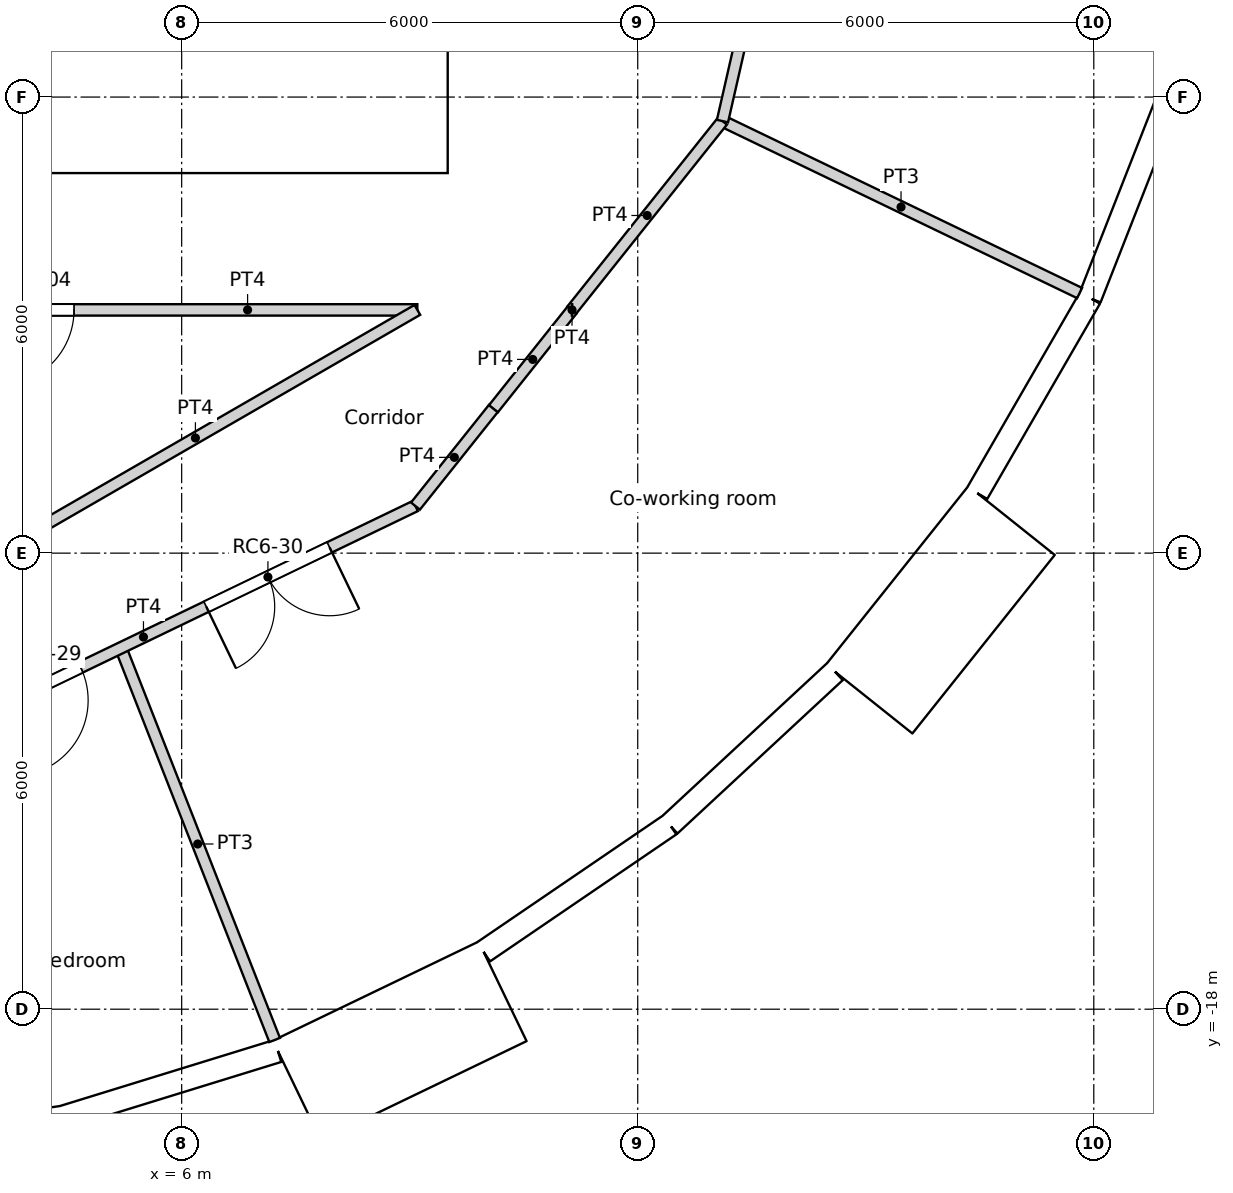
"""IFC4 building model, lengths in metres.
Left out: names, types, materials, properties, quantities, classifications, styles, units other than length and angle.
Written with IfcOpenShell. Run it as: python <this file> out.ifc"""

import sys

from ifc_helpers import new_model, si_unit, direction, frame, frame_2d, origin, origin_2d, place, context, subcontext, project, spatial, rectangle, circle, extrude, element, fill, save


model = new_model("IFC4")
c1 = context("Model", 3, precision=1e-05, world=origin(), true_north=direction((0.0, 1.0)))
c2 = subcontext(c1, "Body", "Model", "MODEL_VIEW")
j1 = project(units=[si_unit("LENGTHUNIT", "METRE"), si_unit("PLANEANGLEUNIT", "RADIAN")], contexts=[c1])
p1 = place(None, origin())
s1 = spatial("IfcSite", under=j1, at=p1, CompositionType="ELEMENT")
p2 = place(p1, origin())
s2 = spatial("IfcBuilding", under=s1, at=p2, CompositionType="ELEMENT")
p3 = place(p2, frame((0.0, 0.0, 283.8)))
s3 = spatial("IfcBuildingStorey", under=s2, at=p3, CompositionType="ELEMENT", Elevation=283.8)
for number, where, z_axis, x_axis in (
    (1, (6.876, -17.521, 0.0), (0.0, 0.0, 1.0), (1.0, 0.0, 0.0)),
    (2, (11.735, -14.716, 0.0), (0.0, 0.0, 1.0), (1.0, 0.0, 0.0)),
    (3, (15.552, -10.603, 0.0), (0.0, 0.0, 1.0), (1.0, 0.0, 0.0)),
    (4, (17.986, -5.548, 0.0), (0.0, 0.0, 1.0), (1.0, 0.0, 0.0)),
):
    element("IfcColumn", number, at=place(p3, frame(where, z_axis=z_axis, x_axis=x_axis)), inside=s3, PredefinedType="COLUMN", context=c2, shape_type="SweptSolid", body=[
        extrude(circle(Radius=0.45, at=origin_2d()), origin(), (0.0, 0.0, 1.0), 3.6),
    ])
p4 = place(p3, frame((1.504, -19.864, 0.0), z_axis=(0.0, 0.0, 1.0), x_axis=(0.988835775663, 0.149009425104, 0.0)))
e5 = element("IfcWall", 5, at=p4, inside=s3, PredefinedType="SOLIDWALL", context=c2, shape_type="SweptSolid", body=[
    extrude(rectangle(XDim=2.962, YDim=0.3, at=frame_2d((1.481, 0.0))), origin(), (0.0, 0.0, 1.0), 3.25),
])
p5 = place(p4, frame((1.481, 0.0, 1.55)))
e6 = element("IfcOpeningElement", 6, at=p5, cuts=e5, PredefinedType="OPENING", context=c2, shape_type="SweptSolid", body=[
    extrude(circle(Radius=0.9, at=origin_2d()), frame((0.0, 0.16, 0.0), z_axis=(0.0, -1.0, 0.0), x_axis=(1.0, 0.0, 0.0)), (0.0, 0.0, 1.0), 0.32),
])
p6 = place(p3, frame((4.433, -19.422, 0.0), z_axis=(0.0, 0.0, 1.0), x_axis=(0.955555982805, 0.29480970765, 0.0)))
e7 = element("IfcWall", 7, at=p6, inside=s3, PredefinedType="SOLIDWALL", context=c2, shape_type="SweptSolid", body=[
    extrude(rectangle(XDim=2.962, YDim=0.3, at=frame_2d((1.481, 0.0))), origin(), (0.0, 0.0, 1.0), 3.25),
])
p7 = place(p6, frame((1.481, 0.0, 1.55)))
e8 = element("IfcOpeningElement", 8, at=p7, cuts=e7, PredefinedType="OPENING", context=c2, shape_type="SweptSolid", body=[
    extrude(circle(Radius=0.9, at=origin_2d()), frame((0.0, 0.16, 0.0), z_axis=(0.0, -1.0, 0.0), x_axis=(1.0, 0.0, 0.0)), (0.0, 0.0, 1.0), 0.32),
])
p8 = place(p3, frame((7.518, -19.068, -0.35), z_axis=(0.0, 0.0, 1.0), x_axis=(0.900953362039, 0.433915935904, 0.0)))
e9 = element("IfcWall", 9, at=p8, inside=s3, PredefinedType="ELEMENTEDWALL", context=c2, shape_type="SweptSolid", body=[
    extrude(rectangle(XDim=3.0, YDim=1.45, at=frame_2d((1.5, 0.0))), origin(), (0.0, 0.0, 1.0), 3.6),
])
p9 = place(p8, frame((1.5, 0.0, 1.9)))
e10 = element("IfcOpeningElement", 10, at=p9, cuts=e9, PredefinedType="OPENING", context=c2, shape_type="SweptSolid", body=[
    extrude(circle(Radius=0.9, at=origin_2d()), frame((0.0, 0.735, 0.0), z_axis=(0.0, -1.0, 0.0), x_axis=(1.0, 0.0, 0.0)), (0.0, 0.0, 1.0), 1.47),
])
p10 = place(p3, frame((9.974, -17.244, 0.0), z_axis=(0.0, 0.0, 1.0), x_axis=(0.826236061068, 0.563324037646, 0.0)))
e11 = element("IfcWall", 11, at=p10, inside=s3, PredefinedType="SOLIDWALL", context=c2, shape_type="SweptSolid", body=[
    extrude(rectangle(XDim=2.962, YDim=0.3, at=frame_2d((1.481, 0.0))), origin(), (0.0, 0.0, 1.0), 3.25),
])
p11 = place(p10, frame((1.481, 0.0, 1.55)))
e12 = element("IfcOpeningElement", 12, at=p11, cuts=e11, PredefinedType="OPENING", context=c2, shape_type="SweptSolid", body=[
    extrude(circle(Radius=0.9, at=origin_2d()), frame((0.0, 0.16, 0.0), z_axis=(0.0, -1.0, 0.0), x_axis=(1.0, 0.0, 0.0)), (0.0, 0.0, 1.0), 0.32),
])
p12 = place(p3, frame((12.421, -15.575, 0.0), z_axis=(0.0, 0.0, 1.0), x_axis=(0.733028283666, 0.680198158882, 0.0)))
e13 = element("IfcWall", 13, at=p12, inside=s3, PredefinedType="SOLIDWALL", context=c2, shape_type="SweptSolid", body=[
    extrude(rectangle(XDim=2.962, YDim=0.3, at=frame_2d((1.481, 0.0))), origin(), (0.0, 0.0, 1.0), 3.25),
])
p13 = place(p12, frame((1.481, 0.0, 1.55)))
e14 = element("IfcOpeningElement", 14, at=p13, cuts=e13, PredefinedType="OPENING", context=c2, shape_type="SweptSolid", body=[
    extrude(circle(Radius=0.9, at=origin_2d()), frame((0.0, 0.16, 0.0), z_axis=(0.0, -1.0, 0.0), x_axis=(1.0, 0.0, 0.0)), (0.0, 0.0, 1.0), 0.32),
])
p14 = place(p3, frame((15.046, -13.917, -0.35), z_axis=(0.0, 0.0, 1.0), x_axis=(0.623523286312, 0.781804778335, 0.0)))
e15 = element("IfcWall", 15, at=p14, inside=s3, PredefinedType="ELEMENTEDWALL", context=c2, shape_type="SweptSolid", body=[
    extrude(rectangle(XDim=3.0, YDim=1.45, at=frame_2d((1.5, 0.0))), origin(), (0.0, 0.0, 1.0), 3.6),
])
p15 = place(p14, frame((1.5, 0.0, 1.9)))
e16 = element("IfcOpeningElement", 16, at=p15, cuts=e15, PredefinedType="OPENING", context=c2, shape_type="SweptSolid", body=[
    extrude(circle(Radius=0.9, at=origin_2d()), frame((0.0, 0.735, 0.0), z_axis=(0.0, -1.0, 0.0), x_axis=(1.0, 0.0, 0.0)), (0.0, 0.0, 1.0), 1.47),
])
p16 = place(p3, frame((16.468, -11.209, 0.0), z_axis=(0.0, 0.0, 1.0), x_axis=(0.500012570604, 0.866018146021, 0.0)))
e17 = element("IfcWall", 17, at=p16, inside=s3, PredefinedType="SOLIDWALL", context=c2, shape_type="SweptSolid", body=[
    extrude(rectangle(XDim=2.962, YDim=0.3, at=frame_2d((1.481, 0.0))), origin(), (0.0, 0.0, 1.0), 3.25),
])
p17 = place(p16, frame((1.481, 0.0, 1.55)))
e18 = element("IfcOpeningElement", 18, at=p17, cuts=e17, PredefinedType="OPENING", context=c2, shape_type="SweptSolid", body=[
    extrude(circle(Radius=0.9, at=origin_2d()), frame((0.0, 0.16, 0.0), z_axis=(0.0, -1.0, 0.0), x_axis=(1.0, 0.0, 0.0)), (0.0, 0.0, 1.0), 0.32),
])
p18 = place(p3, frame((17.949, -8.644, 0.0), z_axis=(0.0, 0.0, 1.0), x_axis=(0.365343821297, 0.930872650925, 0.0)))
e19 = element("IfcWall", 19, at=p18, inside=s3, PredefinedType="SOLIDWALL", context=c2, shape_type="SweptSolid", body=[
    extrude(rectangle(XDim=2.962, YDim=0.3, at=frame_2d((1.481, 0.0))), origin(), (0.0, 0.0, 1.0), 3.25),
])
p19 = place(p18, frame((1.481, 0.0, 1.55)))
e20 = element("IfcOpeningElement", 20, at=p19, cuts=e19, PredefinedType="OPENING", context=c2, shape_type="SweptSolid", body=[
    extrude(circle(Radius=0.9, at=origin_2d()), frame((0.0, 0.16, 0.0), z_axis=(0.0, -1.0, 0.0), x_axis=(1.0, 0.0, 0.0)), (0.0, 0.0, 1.0), 0.32),
])
p20 = place(p3, frame((-9.5, -6.7, 0.0), z_axis=(0.0, 0.0, 1.0), x_axis=(1.0, 0.0, 0.0)))
e21 = element("IfcWall", 21, at=p20, inside=s3, PredefinedType="SOLIDWALL", context=c2, shape_type="SweptSolid", body=[
    extrude(rectangle(XDim=19.0, YDim=0.6, at=frame_2d((9.5, 0.0))), origin(), (0.0, 0.0, 1.0), 3.6),
])
p21 = place(p20, frame((10.4, 0.0, 0.0)))
e22 = element("IfcOpeningElement", 22, at=p21, cuts=e21, PredefinedType="OPENING", context=c2, shape_type="SweptSolid", body=[
    extrude(rectangle(XDim=1.0, YDim=2.1, at=frame_2d((0.5, 1.05))), frame((0.0, 0.3, 0.0), z_axis=(0.0, -1.0, 0.0), x_axis=(1.0, 0.0, 0.0)), (0.0, 0.0, 1.0), 0.6),
])
p22 = place(p20, frame((5.35, 0.0, 0.0)))
e23 = element("IfcOpeningElement", 23, at=p22, cuts=e21, PredefinedType="OPENING", context=c2, shape_type="SweptSolid", body=[
    extrude(rectangle(XDim=1.7, YDim=2.1, at=frame_2d((0.85, 1.05))), frame((0.0, 0.3, 0.0), z_axis=(0.0, -1.0, 0.0), x_axis=(1.0, 0.0, 0.0)), (0.0, 0.0, 1.0), 0.6),
])
p23 = place(p20, frame((11.95, 0.0, 0.0)))
e24 = element("IfcOpeningElement", 24, at=p23, cuts=e21, PredefinedType="OPENING", context=c2, shape_type="SweptSolid", body=[
    extrude(rectangle(XDim=1.7, YDim=2.1, at=frame_2d((0.85, 1.05))), frame((0.0, 0.3, 0.0), z_axis=(0.0, -1.0, 0.0), x_axis=(1.0, 0.0, 0.0)), (0.0, 0.0, 1.0), 0.6),
])
p24 = place(p3, frame((9.2, -6.4, 0.0), z_axis=(0.0, 0.0, 1.0), x_axis=(0.0, 1.0, 0.0)))
e25 = element("IfcWall", 25, at=p24, inside=s3, PredefinedType="SOLIDWALL", context=c2, shape_type="SweptSolid", body=[
    extrude(rectangle(XDim=12.8, YDim=0.6, at=frame_2d((6.4, 0.0))), origin(), (0.0, 0.0, 1.0), 3.6),
])
p25 = place(p24, frame((6.4, 0.0, 0.0)))
e26 = element("IfcOpeningElement", 26, at=p25, cuts=e25, PredefinedType="OPENING", context=c2, shape_type="SweptSolid", body=[
    extrude(rectangle(XDim=1.8, YDim=2.1, at=frame_2d((0.9, 1.05))), frame((0.0, 0.3, 0.0), z_axis=(0.0, -1.0, 0.0), x_axis=(1.0, 0.0, 0.0)), (0.0, 0.0, 1.0), 0.6),
])
p26 = place(p3, frame((-0.924, -8.8, 0.0), z_axis=(0.0, 0.0, 1.0), x_axis=(1.0, 0.0, 0.0)))
e27 = element("IfcWall", 27, at=p26, inside=s3, PredefinedType="PARTITIONING", context=c2, shape_type="SweptSolid", body=[
    extrude(rectangle(XDim=10.025, YDim=0.15, at=frame_2d((5.012, 0.0))), origin(), (0.0, 0.0, 1.0), 3.25),
])
p27 = place(p26, frame((4.508, 0.0, 0.0)))
e28 = element("IfcOpeningElement", 28, at=p27, cuts=e27, PredefinedType="OPENING", context=c2, shape_type="SweptSolid", body=[
    extrude(rectangle(XDim=1.0, YDim=2.04, at=frame_2d((0.5, 1.02))), frame((0.0, 0.075, 0.0), z_axis=(0.0, -1.0, 0.0), x_axis=(1.0, 0.0, 0.0)), (0.0, 0.0, 1.0), 0.15),
])
p28 = place(p3, frame((11.137, -8.8, 0.0), z_axis=(0.0, 0.0, 1.0), x_axis=(-1.0, 0.0, 0.0)))
e29 = element("IfcWall", 29, at=p28, inside=s3, PredefinedType="PARTITIONING", context=c2, shape_type="SweptSolid", body=[
    extrude(rectangle(XDim=0.003, YDim=0.15, at=frame_2d((0.001, 0.0))), origin(), (0.0, 0.0, 1.0), 3.25),
])
p29 = place(p3, frame((10.101, -10.101, 0.0), z_axis=(0.0, 0.0, 1.0), x_axis=(0.623098344652, 0.782143498913, 0.0)))
e30 = element("IfcWall", 30, at=p29, inside=s3, PredefinedType="PARTITIONING", context=c2, shape_type="SweptSolid", body=[
    extrude(rectangle(XDim=1.661, YDim=0.15, at=frame_2d((0.831, 0.0))), origin(), (0.0, 0.0, 1.0), 3.25),
])
p30 = place(p3, frame((11.134, -8.8, 0.0), z_axis=(0.0, 0.0, 1.0), x_axis=(0.623476099415, 0.781842409606, 0.0)))
e31 = element("IfcWall", 31, at=p30, inside=s3, PredefinedType="PARTITIONING", context=c2, shape_type="SweptSolid", body=[
    extrude(rectangle(XDim=3.177, YDim=0.15, at=frame_2d((1.589, 0.0))), origin(), (0.0, 0.0, 1.0), 3.25),
])
p31 = place(p3, frame((13.115, -6.316, 0.0), z_axis=(0.0, 0.0, 1.0), x_axis=(0.222568978642, 0.97491694505, 0.0)))
e32 = element("IfcWall", 32, at=p31, inside=s3, PredefinedType="PARTITIONING", context=c2, shape_type="SweptSolid", body=[
    extrude(rectangle(XDim=6.479, YDim=0.15, at=frame_2d((3.239, 0.0))), origin(), (0.0, 0.0, 1.0), 3.25),
])
p32 = place(p31, frame((2.74, 0.0, 0.0)))
e33 = element("IfcOpeningElement", 33, at=p32, cuts=e32, PredefinedType="OPENING", context=c2, shape_type="SweptSolid", body=[
    extrude(rectangle(XDim=1.0, YDim=2.04, at=frame_2d((0.5, 1.02))), frame((0.0, 0.075, 0.0), z_axis=(0.0, -1.0, 0.0), x_axis=(1.0, 0.0, 0.0)), (0.0, 0.0, 1.0), 0.15),
])
p33 = place(p3, frame((3.261, -12.171, 0.0), z_axis=(0.0, 0.0, 1.0), x_axis=(0.866066809554, 0.499928276245, 0.0)))
e34 = element("IfcWall", 34, at=p33, inside=s3, PredefinedType="PARTITIONING", context=c2, shape_type="SweptSolid", body=[
    extrude(rectangle(XDim=6.743, YDim=0.15, at=frame_2d((3.371, 0.0))), origin(), (0.0, 0.0, 1.0), 3.25),
])
p34 = place(p3, frame((3.239, -14.192, 0.0), z_axis=(0.0, 0.0, 1.0), x_axis=(0.900851590682, 0.434127183629, 0.0)))
e35 = element("IfcWall", 35, at=p34, inside=s3, PredefinedType="PARTITIONING", context=c2, shape_type="SweptSolid", body=[
    extrude(rectangle(XDim=6.479, YDim=0.15, at=frame_2d((3.239, 0.0))), origin(), (0.0, 0.0, 1.0), 3.25),
])
p35 = place(p34, frame((0.589, 0.0, 0.0)))
e36 = element("IfcOpeningElement", 36, at=p35, cuts=e35, PredefinedType="OPENING", context=c2, shape_type="SweptSolid", body=[
    extrude(rectangle(XDim=1.0, YDim=2.1, at=frame_2d((0.5, 1.05))), frame((0.0, 0.075, 0.0), z_axis=(0.0, -1.0, 0.0), x_axis=(1.0, 0.0, 0.0)), (0.0, 0.0, 1.0), 0.15),
])
p36 = place(p34, frame((3.425, 0.0, 0.0)))
e37 = element("IfcOpeningElement", 37, at=p36, cuts=e35, PredefinedType="OPENING", context=c2, shape_type="SweptSolid", body=[
    extrude(rectangle(XDim=1.8, YDim=2.1, at=frame_2d((0.9, 1.05))), frame((0.0, 0.075, 0.0), z_axis=(0.0, -1.0, 0.0), x_axis=(1.0, 0.0, 0.0)), (0.0, 0.0, 1.0), 0.15),
])
p37 = place(p3, frame((9.076, -11.381, 0.0), z_axis=(0.0, 0.0, 1.0), x_axis=(0.623805208652, 0.781579849829, 0.0)))
e38 = element("IfcWall", 38, at=p37, inside=s3, PredefinedType="PARTITIONING", context=c2, shape_type="SweptSolid", body=[
    extrude(rectangle(XDim=1.64, YDim=0.15, at=frame_2d((0.82, 0.0))), origin(), (0.0, 0.0, 1.0), 3.25),
])
p38 = place(p3, frame((5.199, -13.248, 0.0), z_axis=(0.0, 0.0, 1.0), x_axis=(0.365334662456, -0.930876245485, 0.0)))
e39 = element("IfcWall", 39, at=p38, inside=s3, PredefinedType="PARTITIONING", context=c2, shape_type="SweptSolid", body=[
    extrude(rectangle(XDim=5.54, YDim=0.15, at=frame_2d((2.77, 0.0))), origin(), (0.0, 0.0, 1.0), 3.25),
])
p39 = place(p3, frame((13.115, -6.316, 0.0), z_axis=(0.0, 0.0, 1.0), x_axis=(0.901004381064, -0.433809987557, 0.0)))
e40 = element("IfcWall", 40, at=p39, inside=s3, PredefinedType="PARTITIONING", context=c2, shape_type="SweptSolid", body=[
    extrude(rectangle(XDim=5.214, YDim=0.15, at=frame_2d((2.607, 0.0))), origin(), (0.0, 0.0, 1.0), 3.25),
])
p40 = place(p7, origin())
e41 = element("IfcWindow", 41, at=p40, inside=s3, PartitioningType="SINGLE_PANEL", PredefinedType="WINDOW", context=c2, shape_type="SweptSolid", body=[
    extrude(circle(Radius=0.9, at=origin_2d()), frame((0.0, 0.12, 0.0), z_axis=(0.0, -1.0, 0.0), x_axis=(1.0, 0.0, 0.0)), (0.0, 0.0, 1.0), 0.1),
])
fill(e8, e41)
p41 = place(p9, origin())
e42 = element("IfcWindow", 42, at=p41, inside=s3, PartitioningType="SINGLE_PANEL", PredefinedType="WINDOW", context=c2, shape_type="SweptSolid", body=[
    extrude(circle(Radius=0.9, at=origin_2d()), frame((0.0, 0.695, 0.0), z_axis=(0.0, -1.0, 0.0), x_axis=(1.0, 0.0, 0.0)), (0.0, 0.0, 1.0), 0.1),
])
fill(e10, e42)
p42 = place(p11, origin())
e43 = element("IfcWindow", 43, at=p42, inside=s3, PartitioningType="SINGLE_PANEL", PredefinedType="WINDOW", context=c2, shape_type="SweptSolid", body=[
    extrude(circle(Radius=0.9, at=origin_2d()), frame((0.0, 0.12, 0.0), z_axis=(0.0, -1.0, 0.0), x_axis=(1.0, 0.0, 0.0)), (0.0, 0.0, 1.0), 0.1),
])
fill(e12, e43)
p43 = place(p13, origin())
e44 = element("IfcWindow", 44, at=p43, inside=s3, PartitioningType="SINGLE_PANEL", PredefinedType="WINDOW", context=c2, shape_type="SweptSolid", body=[
    extrude(circle(Radius=0.9, at=origin_2d()), frame((0.0, 0.12, 0.0), z_axis=(0.0, -1.0, 0.0), x_axis=(1.0, 0.0, 0.0)), (0.0, 0.0, 1.0), 0.1),
])
fill(e14, e44)
p44 = place(p15, origin())
e45 = element("IfcWindow", 45, at=p44, inside=s3, PartitioningType="SINGLE_PANEL", PredefinedType="WINDOW", context=c2, shape_type="SweptSolid", body=[
    extrude(circle(Radius=0.9, at=origin_2d()), frame((0.0, 0.695, 0.0), z_axis=(0.0, -1.0, 0.0), x_axis=(1.0, 0.0, 0.0)), (0.0, 0.0, 1.0), 0.1),
])
fill(e16, e45)
p45 = place(p17, origin())
e46 = element("IfcWindow", 46, at=p45, inside=s3, PartitioningType="SINGLE_PANEL", PredefinedType="WINDOW", context=c2, shape_type="SweptSolid", body=[
    extrude(circle(Radius=0.9, at=origin_2d()), frame((0.0, 0.12, 0.0), z_axis=(0.0, -1.0, 0.0), x_axis=(1.0, 0.0, 0.0)), (0.0, 0.0, 1.0), 0.1),
])
fill(e18, e46)
p46 = place(p19, origin())
e47 = element("IfcWindow", 47, at=p46, inside=s3, PartitioningType="SINGLE_PANEL", PredefinedType="WINDOW", context=c2, shape_type="SweptSolid", body=[
    extrude(circle(Radius=0.9, at=origin_2d()), frame((0.0, 0.12, 0.0), z_axis=(0.0, -1.0, 0.0), x_axis=(1.0, 0.0, 0.0)), (0.0, 0.0, 1.0), 0.1),
])
fill(e20, e47)
p47 = place(p27, origin())
e48 = element("IfcDoor", 48, at=p47, inside=s3, OperationType="SINGLE_SWING_RIGHT", PredefinedType="DOOR", context=c2, shape_type="SweptSolid", body=[
    extrude(rectangle(XDim=1.0, YDim=2.04, at=frame_2d((0.5, 1.02))), frame((0.0, 0.025, 0.0), z_axis=(0.0, -1.0, 0.0), x_axis=(1.0, 0.0, 0.0)), (0.0, 0.0, 1.0), 0.05),
])
fill(e28, e48)
p48 = place(p35, origin())
e49 = element("IfcDoor", 49, at=p48, inside=s3, OperationType="SINGLE_SWING_RIGHT", PredefinedType="DOOR", context=c2, shape_type="SweptSolid", body=[
    extrude(rectangle(XDim=1.0, YDim=2.1, at=frame_2d((0.5, 1.05))), frame((0.0, 0.025, 0.0), z_axis=(0.0, -1.0, 0.0), x_axis=(1.0, 0.0, 0.0)), (0.0, 0.0, 1.0), 0.05),
])
fill(e36, e49)
p49 = place(p36, origin())
e50 = element("IfcDoor", 50, at=p49, inside=s3, OperationType="DOUBLE_DOOR_SINGLE_SWING", PredefinedType="DOOR", context=c2, shape_type="SweptSolid", body=[
    extrude(rectangle(XDim=1.8, YDim=2.1, at=frame_2d((0.9, 1.05))), frame((0.0, 0.025, 0.0), z_axis=(0.0, -1.0, 0.0), x_axis=(1.0, 0.0, 0.0)), (0.0, 0.0, 1.0), 0.05),
])
fill(e37, e50)
save(model, sys.argv[1])
